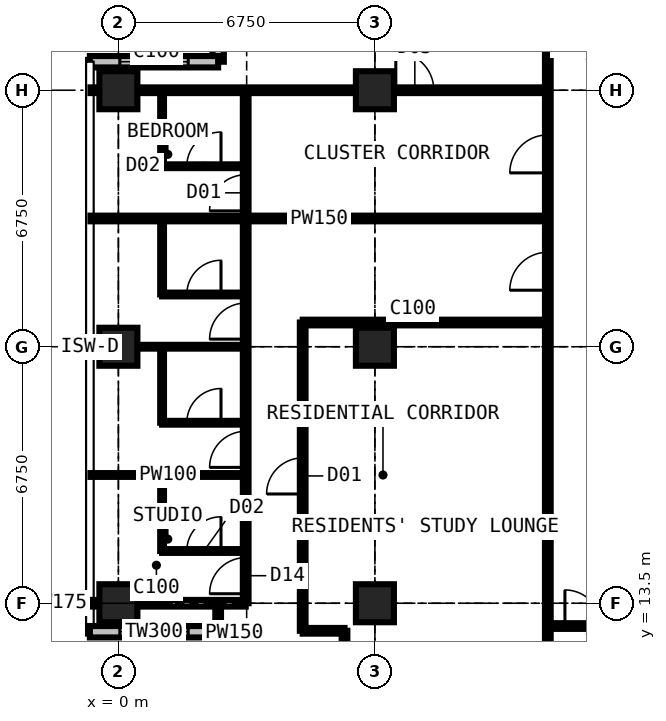
"""IFC4 building model, lengths in metres.
Left out: names, types, materials, properties, quantities, classifications, styles, units other than length and angle.
Written with IfcOpenShell. Run it as: python <this file> out.ifc"""

import sys

from ifc_helpers import new_model, si_unit, direction, frame, frame_2d, origin, origin_2d, place, context, subcontext, project, spatial, rectangle, extrude, element, fill, save


model = new_model("IFC4")
c1 = context("Model", 3, precision=1e-05, world=origin(), true_north=direction((0.0, 1.0)))
c2 = subcontext(c1, "Body", "Model", "MODEL_VIEW")
j1 = project(units=[si_unit("LENGTHUNIT", "METRE"), si_unit("PLANEANGLEUNIT", "RADIAN")], contexts=[c1])
p1 = place(None, origin())
s1 = spatial("IfcSite", under=j1, at=p1, CompositionType="ELEMENT")
p2 = place(p1, origin())
s2 = spatial("IfcBuilding", under=s1, at=p2, CompositionType="ELEMENT")
p3 = place(p2, frame((0.0, 0.0, 240.3)))
s3 = spatial("IfcBuildingStorey", under=s2, at=p3, CompositionType="ELEMENT", Elevation=240.3)
for number, where, z_axis, x_axis in (
    (1, (0.0, 13.5, 0.0), (0.0, 0.0, 1.0), (1.0, 0.0, 0.0)),
    (2, (0.0, 20.25, 0.0), (0.0, 0.0, 1.0), (1.0, 0.0, 0.0)),
    (3, (0.0, 27.0, 0.0), (0.0, 0.0, 1.0), (1.0, 0.0, 0.0)),
    (4, (6.75, 13.5, 0.0), (0.0, 0.0, 1.0), (1.0, 0.0, 0.0)),
    (5, (6.75, 20.25, 0.0), (0.0, 0.0, 1.0), (1.0, 0.0, 0.0)),
    (6, (6.75, 27.0, 0.0), (0.0, 0.0, 1.0), (1.0, 0.0, 0.0)),
):
    element("IfcColumn", number, at=place(p3, frame(where, z_axis=z_axis, x_axis=x_axis)), inside=s3, PredefinedType="COLUMN", context=c2, shape_type="SweptSolid", body=[
        extrude(rectangle(XDim=1.0, YDim=1.0, at=origin_2d()), origin(), (0.0, 0.0, 1.0), 3.6),
    ])
p4 = place(p3, frame((2.625, 31.125, 0.0), z_axis=(0.0, 0.0, 1.0), x_axis=(0.0, -1.0, 0.0)))
e7 = element("IfcWall", 7, at=p4, inside=s3, PredefinedType="SOLIDWALL", context=c2, shape_type="SweptSolid", body=[
    extrude(rectangle(XDim=3.375, YDim=0.3, at=frame_2d((1.688, 0.0))), origin(), (0.0, 0.0, 1.0), 3.375),
])
p5 = place(p4, frame((0.788, 0.0, 0.6)))
e8 = element("IfcOpeningElement", 8, at=p5, cuts=e7, PredefinedType="OPENING", context=c2, shape_type="SweptSolid", body=[
    extrude(rectangle(XDim=1.8, YDim=2.1, at=frame_2d((0.9, 1.05))), frame((0.0, 0.16, 0.0), z_axis=(0.0, -1.0, 0.0), x_axis=(1.0, 0.0, 0.0)), (0.0, 0.0, 1.0), 0.32),
])
p6 = place(p3, frame((2.625, 27.75, 0.0), z_axis=(0.0, 0.0, 1.0), x_axis=(-1.0, 0.0, 0.0)))
e9 = element("IfcWall", 9, at=p6, inside=s3, PredefinedType="SOLIDWALL", context=c2, shape_type="SweptSolid", body=[
    extrude(rectangle(XDim=3.375, YDim=0.3, at=frame_2d((1.688, 0.0))), origin(), (0.0, 0.0, 1.0), 3.375),
])
p7 = place(p6, frame((0.788, 0.0, 0.6)))
e10 = element("IfcOpeningElement", 10, at=p7, cuts=e9, PredefinedType="OPENING", context=c2, shape_type="SweptSolid", body=[
    extrude(rectangle(XDim=1.8, YDim=2.1, at=frame_2d((0.9, 1.05))), frame((0.0, 0.16, 0.0), z_axis=(0.0, -1.0, 0.0), x_axis=(1.0, 0.0, 0.0)), (0.0, 0.0, 1.0), 0.32),
])
p8 = place(p3, frame((-0.75, 12.75, 0.0), z_axis=(0.0, 0.0, 1.0), x_axis=(1.0, 0.0, 0.0)))
e11 = element("IfcWall", 11, at=p8, inside=s3, PredefinedType="SOLIDWALL", context=c2, shape_type="SweptSolid", body=[
    extrude(rectangle(XDim=3.375, YDim=0.3, at=frame_2d((1.688, 0.0))), origin(), (0.0, 0.0, 1.0), 3.375),
])
p9 = place(p8, frame((0.788, 0.0, 0.6)))
e12 = element("IfcOpeningElement", 12, at=p9, cuts=e11, PredefinedType="OPENING", context=c2, shape_type="SweptSolid", body=[
    extrude(rectangle(XDim=1.8, YDim=2.1, at=frame_2d((0.9, 1.05))), frame((0.0, 0.16, 0.0), z_axis=(0.0, -1.0, 0.0), x_axis=(1.0, 0.0, 0.0)), (0.0, 0.0, 1.0), 0.32),
])
p10 = place(p3, frame((2.625, 12.75, 0.0), z_axis=(0.0, 0.0, 1.0), x_axis=(0.0, -1.0, 0.0)))
e13 = element("IfcWall", 13, at=p10, inside=s3, PredefinedType="SOLIDWALL", context=c2, shape_type="SweptSolid", body=[
    extrude(rectangle(XDim=3.375, YDim=0.3, at=frame_2d((1.688, 0.0))), origin(), (0.0, 0.0, 1.0), 3.375),
])
p11 = place(p10, frame((0.788, 0.0, 0.6)))
e14 = element("IfcOpeningElement", 14, at=p11, cuts=e13, PredefinedType="OPENING", context=c2, shape_type="SweptSolid", body=[
    extrude(rectangle(XDim=1.8, YDim=2.1, at=frame_2d((0.9, 1.05))), frame((0.0, 0.16, 0.0), z_axis=(0.0, -1.0, 0.0), x_axis=(1.0, 0.0, 0.0)), (0.0, 0.0, 1.0), 0.32),
])
p12 = place(p3, frame((-0.734, 13.5, 0.0), z_axis=(0.0, 0.0, 1.0), x_axis=(1.0, 0.0, 0.0)))
e15 = element("IfcWall", 15, at=p12, inside=s3, PredefinedType="PARTITIONING", context=c2, shape_type="SweptSolid", body=[
    extrude(rectangle(XDim=4.084, YDim=0.175, at=frame_2d((2.042, 0.0))), origin(), (0.0, 0.0, 1.0), 2.877),
])
p13 = place(p3, frame((-0.734, 16.875, 0.0), z_axis=(0.0, 0.0, 1.0), x_axis=(1.0, 0.0, 0.0)))
e16 = element("IfcWall", 16, at=p13, inside=s3, PredefinedType="PARTITIONING", context=c2, shape_type="SweptSolid", body=[
    extrude(rectangle(XDim=4.084, YDim=0.1, at=frame_2d((2.042, 0.0))), origin(), (0.0, 0.0, 1.0), 3.375),
])
p14 = place(p3, frame((-0.734, 20.25, 0.0), z_axis=(0.0, 0.0, 1.0), x_axis=(1.0, 0.0, 0.0)))
e17 = element("IfcWall", 17, at=p14, inside=s3, PredefinedType="PARTITIONING", context=c2, shape_type="SweptSolid", body=[
    extrude(rectangle(XDim=4.084, YDim=0.1, at=frame_2d((2.042, 0.0))), origin(), (0.0, 0.0, 1.0), 2.877),
])
p15 = place(p3, frame((-0.734, 23.625, 0.0), z_axis=(0.0, 0.0, 1.0), x_axis=(1.0, 0.0, 0.0)))
e18 = element("IfcWall", 18, at=p15, inside=s3, PredefinedType="PARTITIONING", context=c2, shape_type="SweptSolid", body=[
    extrude(rectangle(XDim=12.034, YDim=0.15, at=frame_2d((6.017, 0.0))), origin(), (0.0, 0.0, 1.0), 3.375),
])
p16 = place(p3, frame((-0.734, 27.0, 0.0), z_axis=(0.0, 0.0, 1.0), x_axis=(1.0, 0.0, 0.0)))
e19 = element("IfcWall", 19, at=p16, inside=s3, PredefinedType="PARTITIONING", context=c2, shape_type="SweptSolid", body=[
    extrude(rectangle(XDim=12.034, YDim=0.15, at=frame_2d((6.017, 0.0))), origin(), (0.0, 0.0, 1.0), 2.877),
])
p17 = place(p16, frame((8.034, 0.0, 0.0)))
e20 = element("IfcOpeningElement", 20, at=p17, cuts=e19, PredefinedType="OPENING", context=c2, shape_type="SweptSolid", body=[
    extrude(rectangle(XDim=1.0, YDim=2.2, at=frame_2d((0.5, 1.1))), frame((0.0, 0.085, 0.0), z_axis=(0.0, -1.0, 0.0), x_axis=(1.0, 0.0, 0.0)), (0.0, 0.0, 1.0), 0.17),
])
p18 = place(p3, frame((1.15, 14.875, 0.0), z_axis=(0.0, 0.0, 1.0), x_axis=(0.0, 1.0, 0.0)))
e21 = element("IfcWall", 21, at=p18, inside=s3, PredefinedType="PARTITIONING", context=c2, shape_type="SweptSolid", body=[
    extrude(rectangle(XDim=2.0, YDim=0.1, at=frame_2d((1.0, 0.0))), origin(), (0.0, 0.0, 1.0), 3.375),
])
p19 = place(p3, frame((1.15, 14.875, 0.0), z_axis=(0.0, 0.0, 1.0), x_axis=(1.0, 0.0, 0.0)))
e22 = element("IfcWall", 22, at=p19, inside=s3, PredefinedType="PARTITIONING", context=c2, shape_type="SweptSolid", body=[
    extrude(rectangle(XDim=2.2, YDim=0.1, at=frame_2d((1.1, 0.0))), origin(), (0.0, 0.0, 1.0), 3.375),
])
p20 = place(p19, frame((0.65, 0.0, 0.0)))
e23 = element("IfcOpeningElement", 23, at=p20, cuts=e22, PredefinedType="OPENING", context=c2, shape_type="SweptSolid", body=[
    extrude(rectangle(XDim=0.9, YDim=2.2, at=frame_2d((0.45, 1.1))), frame((0.0, 0.06, 0.0), z_axis=(0.0, -1.0, 0.0), x_axis=(1.0, 0.0, 0.0)), (0.0, 0.0, 1.0), 0.12),
])
p21 = place(p3, frame((1.15, 18.25, 0.0), z_axis=(0.0, 0.0, 1.0), x_axis=(0.0, 1.0, 0.0)))
e24 = element("IfcWall", 24, at=p21, inside=s3, PredefinedType="PARTITIONING", context=c2, shape_type="SweptSolid", body=[
    extrude(rectangle(XDim=2.0, YDim=0.1, at=frame_2d((1.0, 0.0))), origin(), (0.0, 0.0, 1.0), 3.375),
])
p22 = place(p3, frame((1.15, 18.25, 0.0), z_axis=(0.0, 0.0, 1.0), x_axis=(1.0, 0.0, 0.0)))
e25 = element("IfcWall", 25, at=p22, inside=s3, PredefinedType="PARTITIONING", context=c2, shape_type="SweptSolid", body=[
    extrude(rectangle(XDim=2.2, YDim=0.1, at=frame_2d((1.1, 0.0))), origin(), (0.0, 0.0, 1.0), 3.375),
])
p23 = place(p22, frame((0.65, 0.0, 0.0)))
e26 = element("IfcOpeningElement", 26, at=p23, cuts=e25, PredefinedType="OPENING", context=c2, shape_type="SweptSolid", body=[
    extrude(rectangle(XDim=0.9, YDim=2.2, at=frame_2d((0.45, 1.1))), frame((0.0, 0.06, 0.0), z_axis=(0.0, -1.0, 0.0), x_axis=(1.0, 0.0, 0.0)), (0.0, 0.0, 1.0), 0.12),
])
p24 = place(p3, frame((1.15, 21.625, 0.0), z_axis=(0.0, 0.0, 1.0), x_axis=(0.0, 1.0, 0.0)))
e27 = element("IfcWall", 27, at=p24, inside=s3, PredefinedType="PARTITIONING", context=c2, shape_type="SweptSolid", body=[
    extrude(rectangle(XDim=2.0, YDim=0.1, at=frame_2d((1.0, 0.0))), origin(), (0.0, 0.0, 1.0), 3.375),
])
p25 = place(p3, frame((1.15, 21.625, 0.0), z_axis=(0.0, 0.0, 1.0), x_axis=(1.0, 0.0, 0.0)))
e28 = element("IfcWall", 28, at=p25, inside=s3, PredefinedType="PARTITIONING", context=c2, shape_type="SweptSolid", body=[
    extrude(rectangle(XDim=2.2, YDim=0.1, at=frame_2d((1.1, 0.0))), origin(), (0.0, 0.0, 1.0), 3.375),
])
p26 = place(p25, frame((0.65, 0.0, 0.0)))
e29 = element("IfcOpeningElement", 29, at=p26, cuts=e28, PredefinedType="OPENING", context=c2, shape_type="SweptSolid", body=[
    extrude(rectangle(XDim=0.9, YDim=2.2, at=frame_2d((0.45, 1.1))), frame((0.0, 0.06, 0.0), z_axis=(0.0, -1.0, 0.0), x_axis=(1.0, 0.0, 0.0)), (0.0, 0.0, 1.0), 0.12),
])
p27 = place(p3, frame((1.15, 25.0, 0.0), z_axis=(0.0, 0.0, 1.0), x_axis=(0.0, 1.0, 0.0)))
e30 = element("IfcWall", 30, at=p27, inside=s3, PredefinedType="PARTITIONING", context=c2, shape_type="SweptSolid", body=[
    extrude(rectangle(XDim=2.0, YDim=0.1, at=frame_2d((1.0, 0.0))), origin(), (0.0, 0.0, 1.0), 3.375),
])
p28 = place(p3, frame((1.15, 25.0, 0.0), z_axis=(0.0, 0.0, 1.0), x_axis=(1.0, 0.0, 0.0)))
e31 = element("IfcWall", 31, at=p28, inside=s3, PredefinedType="PARTITIONING", context=c2, shape_type="SweptSolid", body=[
    extrude(rectangle(XDim=2.2, YDim=0.1, at=frame_2d((1.1, 0.0))), origin(), (0.0, 0.0, 1.0), 3.375),
])
p29 = place(p28, frame((0.65, 0.0, 0.0)))
e32 = element("IfcOpeningElement", 32, at=p29, cuts=e31, PredefinedType="OPENING", context=c2, shape_type="SweptSolid", body=[
    extrude(rectangle(XDim=0.9, YDim=2.2, at=frame_2d((0.45, 1.1))), frame((0.0, 0.06, 0.0), z_axis=(0.0, -1.0, 0.0), x_axis=(1.0, 0.0, 0.0)), (0.0, 0.0, 1.0), 0.12),
])
p30 = place(p3, frame((2.625, 12.766, 0.0), z_axis=(0.0, 0.0, 1.0), x_axis=(0.0, 1.0, 0.0)))
e33 = element("IfcWall", 33, at=p30, inside=s3, PredefinedType="PARTITIONING", context=c2, shape_type="SweptSolid", body=[
    extrude(rectangle(XDim=0.734, YDim=0.15, at=frame_2d((0.367, 0.0))), origin(), (0.0, 0.0, 1.0), 3.375),
])
p31 = place(p3, frame((3.35, 13.5, 0.0), z_axis=(0.0, 0.0, 1.0), x_axis=(0.0, 1.0, 0.0)))
e34 = element("IfcWall", 34, at=p31, inside=s3, PredefinedType="PARTITIONING", context=c2, shape_type="SweptSolid", body=[
    extrude(rectangle(XDim=13.5, YDim=0.15, at=frame_2d((6.75, 0.0))), origin(), (0.0, 0.0, 1.0), 3.375),
])
p32 = place(p31, frame((10.325, 0.0, 0.0)))
e35 = element("IfcOpeningElement", 35, at=p32, cuts=e34, PredefinedType="OPENING", context=c2, shape_type="SweptSolid", body=[
    extrude(rectangle(XDim=0.95, YDim=2.2, at=frame_2d((0.475, 1.1))), frame((0.0, 0.085, 0.0), z_axis=(0.0, -1.0, 0.0), x_axis=(1.0, 0.0, 0.0)), (0.0, 0.0, 1.0), 0.17),
])
p33 = place(p31, frame((0.25, 0.0, 0.0)))
e36 = element("IfcOpeningElement", 36, at=p33, cuts=e34, PredefinedType="OPENING", context=c2, shape_type="SweptSolid", body=[
    extrude(rectangle(XDim=0.95, YDim=2.2, at=frame_2d((0.475, 1.1))), frame((0.0, 0.085, 0.0), z_axis=(0.0, -1.0, 0.0), x_axis=(1.0, 0.0, 0.0)), (0.0, 0.0, 1.0), 0.17),
])
p34 = place(p31, frame((3.575, 0.0, 0.0)))
e37 = element("IfcOpeningElement", 37, at=p34, cuts=e34, PredefinedType="OPENING", context=c2, shape_type="SweptSolid", body=[
    extrude(rectangle(XDim=0.95, YDim=2.2, at=frame_2d((0.475, 1.1))), frame((0.0, 0.085, 0.0), z_axis=(0.0, -1.0, 0.0), x_axis=(1.0, 0.0, 0.0)), (0.0, 0.0, 1.0), 0.17),
])
p35 = place(p31, frame((6.95, 0.0, 0.0)))
e38 = element("IfcOpeningElement", 38, at=p35, cuts=e34, PredefinedType="OPENING", context=c2, shape_type="SweptSolid", body=[
    extrude(rectangle(XDim=0.95, YDim=2.2, at=frame_2d((0.475, 1.1))), frame((0.0, 0.085, 0.0), z_axis=(0.0, -1.0, 0.0), x_axis=(1.0, 0.0, 0.0)), (0.0, 0.0, 1.0), 0.17),
])
p36 = place(p3, frame((4.85, 12.775, 0.0), z_axis=(0.0, 0.0, 1.0), x_axis=(0.0, 1.0, 0.0)))
e39 = element("IfcWall", 39, at=p36, inside=s3, PredefinedType="PARTITIONING", context=c2, shape_type="SweptSolid", body=[
    extrude(rectangle(XDim=8.113, YDim=0.15, at=frame_2d((4.056, 0.0))), origin(), (0.0, 0.0, 1.0), 3.375),
])
p37 = place(p36, frame((3.6, 0.0, 0.0)))
e40 = element("IfcOpeningElement", 40, at=p37, cuts=e39, PredefinedType="OPENING", context=c2, shape_type="SweptSolid", body=[
    extrude(rectangle(XDim=0.95, YDim=2.2, at=frame_2d((0.475, 1.1))), frame((0.0, 0.085, 0.0), z_axis=(0.0, -1.0, 0.0), x_axis=(1.0, 0.0, 0.0)), (0.0, 0.0, 1.0), 0.17),
])
p38 = place(p3, frame((4.85, 12.775, 0.0), z_axis=(0.0, 0.0, 1.0), x_axis=(1.0, 0.0, 0.0)))
e41 = element("IfcWall", 41, at=p38, inside=s3, PredefinedType="PARTITIONING", context=c2, shape_type="SweptSolid", body=[
    extrude(rectangle(XDim=1.1, YDim=0.15, at=frame_2d((0.55, 0.0))), origin(), (0.0, 0.0, 1.0), 3.375),
])
p39 = place(p3, frame((4.85, 20.887, 0.0), z_axis=(0.0, 0.0, 1.0), x_axis=(1.0, 0.0, 0.0)))
e42 = element("IfcWall", 42, at=p39, inside=s3, PredefinedType="PARTITIONING", context=c2, shape_type="SweptSolid", body=[
    extrude(rectangle(XDim=6.45, YDim=0.15, at=frame_2d((3.225, 0.0))), origin(), (0.0, 0.0, 1.0), 3.375),
])
p40 = place(p3, frame((5.95, 10.125, 0.0), z_axis=(0.0, 0.0, 1.0), x_axis=(0.0, 1.0, 0.0)))
e43 = element("IfcWall", 43, at=p40, inside=s3, PredefinedType="PARTITIONING", context=c2, shape_type="SweptSolid", body=[
    extrude(rectangle(XDim=2.65, YDim=0.15, at=frame_2d((1.325, 0.0))), origin(), (0.0, 0.0, 1.0), 3.375),
])
p41 = place(p3, frame((11.3, 11.3, 0.0), z_axis=(0.0, 0.0, 1.0), x_axis=(0.0, 1.0, 0.0)))
e44 = element("IfcWall", 44, at=p41, inside=s3, PredefinedType="PARTITIONING", context=c2, shape_type="SweptSolid", body=[
    extrude(rectangle(XDim=19.3, YDim=0.15, at=frame_2d((9.65, 0.0))), origin(), (0.0, 0.0, 1.0), 3.375),
])
p42 = place(p41, frame((13.525, 0.0, 0.0)))
e45 = element("IfcOpeningElement", 45, at=p42, cuts=e44, PredefinedType="OPENING", context=c2, shape_type="SweptSolid", body=[
    extrude(rectangle(XDim=1.0, YDim=2.2, at=frame_2d((0.5, 1.1))), frame((0.0, 0.085, 0.0), z_axis=(0.0, -1.0, 0.0), x_axis=(1.0, 0.0, 0.0)), (0.0, 0.0, 1.0), 0.17),
])
p43 = place(p41, frame((10.438, 0.0, 0.0)))
e46 = element("IfcOpeningElement", 46, at=p43, cuts=e44, PredefinedType="OPENING", context=c2, shape_type="SweptSolid", body=[
    extrude(rectangle(XDim=1.0, YDim=2.2, at=frame_2d((0.5, 1.1))), frame((0.0, 0.085, 0.0), z_axis=(0.0, -1.0, 0.0), x_axis=(1.0, 0.0, 0.0)), (0.0, 0.0, 1.0), 0.17),
])
p44 = place(p3, frame((11.3, 12.9, 0.0), z_axis=(0.0, 0.0, 1.0), x_axis=(1.0, 0.0, 0.0)))
e47 = element("IfcWall", 47, at=p44, inside=s3, PredefinedType="PARTITIONING", context=c2, shape_type="SweptSolid", body=[
    extrude(rectangle(XDim=1.9, YDim=0.15, at=frame_2d((0.95, 0.0))), origin(), (0.0, 0.0, 1.0), 2.877),
])
p45 = place(p44, frame((0.45, 0.0, 0.0)))
e48 = element("IfcOpeningElement", 48, at=p45, cuts=e47, PredefinedType="OPENING", context=c2, shape_type="SweptSolid", body=[
    extrude(rectangle(XDim=0.95, YDim=2.2, at=frame_2d((0.475, 1.1))), frame((0.0, 0.085, 0.0), z_axis=(0.0, -1.0, 0.0), x_axis=(1.0, 0.0, 0.0)), (0.0, 0.0, 1.0), 0.17),
])
p46 = place(p7, origin())
e49 = element("IfcWindow", 49, at=p46, inside=s3, PartitioningType="SINGLE_PANEL", PredefinedType="WINDOW", context=c2, shape_type="SweptSolid", body=[
    extrude(rectangle(XDim=1.8, YDim=2.1, at=frame_2d((0.9, 1.05))), frame((0.0, 0.03, 0.0), z_axis=(0.0, -1.0, 0.0), x_axis=(1.0, 0.0, 0.0)), (0.0, 0.0, 1.0), 0.06),
])
fill(e10, e49)
p47 = place(p9, origin())
e50 = element("IfcWindow", 50, at=p47, inside=s3, PartitioningType="SINGLE_PANEL", PredefinedType="WINDOW", context=c2, shape_type="SweptSolid", body=[
    extrude(rectangle(XDim=1.8, YDim=2.1, at=frame_2d((0.9, 1.05))), frame((0.0, 0.03, 0.0), z_axis=(0.0, -1.0, 0.0), x_axis=(1.0, 0.0, 0.0)), (0.0, 0.0, 1.0), 0.06),
])
fill(e12, e50)
p48 = place(p45, origin())
e51 = element("IfcDoor", 51, at=p48, inside=s3, OperationType="SINGLE_SWING_LEFT", PredefinedType="DOOR", context=c2, shape_type="SweptSolid", body=[
    extrude(rectangle(XDim=0.95, YDim=2.2, at=frame_2d((0.475, 1.1))), frame((0.0, 0.025, 0.0), z_axis=(0.0, -1.0, 0.0), x_axis=(1.0, 0.0, 0.0)), (0.0, 0.0, 1.0), 0.05),
])
fill(e48, e51)
p49 = place(p17, origin())
e52 = element("IfcDoor", 52, at=p49, inside=s3, OperationType="SINGLE_SWING_LEFT", PredefinedType="DOOR", context=c2, shape_type="SweptSolid", body=[
    extrude(rectangle(XDim=1.0, YDim=2.2, at=frame_2d((0.5, 1.1))), frame((0.0, 0.025, 0.0), z_axis=(0.0, -1.0, 0.0), x_axis=(1.0, 0.0, 0.0)), (0.0, 0.0, 1.0), 0.05),
])
fill(e20, e52)
p50 = place(p32, origin())
e53 = element("IfcDoor", 53, at=p50, inside=s3, OperationType="SINGLE_SWING_LEFT", PredefinedType="DOOR", context=c2, shape_type="SweptSolid", body=[
    extrude(rectangle(XDim=0.95, YDim=2.2, at=frame_2d((0.475, 1.1))), frame((0.0, 0.025, 0.0), z_axis=(0.0, -1.0, 0.0), x_axis=(1.0, 0.0, 0.0)), (0.0, 0.0, 1.0), 0.05),
])
fill(e35, e53)
p51 = place(p29, origin())
e54 = element("IfcDoor", 54, at=p51, inside=s3, OperationType="SINGLE_SWING_RIGHT", PredefinedType="DOOR", context=c2, shape_type="SweptSolid", body=[
    extrude(rectangle(XDim=0.9, YDim=2.2, at=frame_2d((0.45, 1.1))), frame((0.0, 0.025, 0.0), z_axis=(0.0, -1.0, 0.0), x_axis=(1.0, 0.0, 0.0)), (0.0, 0.0, 1.0), 0.05),
])
fill(e32, e54)
p52 = place(p42, origin())
e55 = element("IfcDoor", 55, at=p52, inside=s3, OperationType="SINGLE_SWING_LEFT", PredefinedType="DOOR", context=c2, shape_type="SweptSolid", body=[
    extrude(rectangle(XDim=1.0, YDim=2.2, at=frame_2d((0.5, 1.1))), frame((0.0, 0.025, 0.0), z_axis=(0.0, -1.0, 0.0), x_axis=(1.0, 0.0, 0.0)), (0.0, 0.0, 1.0), 0.05),
])
fill(e45, e55)
p53 = place(p33, origin())
e56 = element("IfcDoor", 56, at=p53, inside=s3, OperationType="SINGLE_SWING_LEFT", PredefinedType="DOOR", context=c2, shape_type="SweptSolid", body=[
    extrude(rectangle(XDim=0.95, YDim=2.2, at=frame_2d((0.475, 1.1))), frame((0.0, 0.025, 0.0), z_axis=(0.0, -1.0, 0.0), x_axis=(1.0, 0.0, 0.0)), (0.0, 0.0, 1.0), 0.05),
])
fill(e36, e56)
p54 = place(p20, origin())
e57 = element("IfcDoor", 57, at=p54, inside=s3, OperationType="SINGLE_SWING_RIGHT", PredefinedType="DOOR", context=c2, shape_type="SweptSolid", body=[
    extrude(rectangle(XDim=0.9, YDim=2.2, at=frame_2d((0.45, 1.1))), frame((0.0, 0.025, 0.0), z_axis=(0.0, -1.0, 0.0), x_axis=(1.0, 0.0, 0.0)), (0.0, 0.0, 1.0), 0.05),
])
fill(e23, e57)
p55 = place(p34, origin())
e58 = element("IfcDoor", 58, at=p55, inside=s3, OperationType="SINGLE_SWING_LEFT", PredefinedType="DOOR", context=c2, shape_type="SweptSolid", body=[
    extrude(rectangle(XDim=0.95, YDim=2.2, at=frame_2d((0.475, 1.1))), frame((0.0, 0.025, 0.0), z_axis=(0.0, -1.0, 0.0), x_axis=(1.0, 0.0, 0.0)), (0.0, 0.0, 1.0), 0.05),
])
fill(e37, e58)
p56 = place(p23, origin())
e59 = element("IfcDoor", 59, at=p56, inside=s3, OperationType="SINGLE_SWING_RIGHT", PredefinedType="DOOR", context=c2, shape_type="SweptSolid", body=[
    extrude(rectangle(XDim=0.9, YDim=2.2, at=frame_2d((0.45, 1.1))), frame((0.0, 0.025, 0.0), z_axis=(0.0, -1.0, 0.0), x_axis=(1.0, 0.0, 0.0)), (0.0, 0.0, 1.0), 0.05),
])
fill(e26, e59)
p57 = place(p35, origin())
e60 = element("IfcDoor", 60, at=p57, inside=s3, OperationType="SINGLE_SWING_LEFT", PredefinedType="DOOR", context=c2, shape_type="SweptSolid", body=[
    extrude(rectangle(XDim=0.95, YDim=2.2, at=frame_2d((0.475, 1.1))), frame((0.0, 0.025, 0.0), z_axis=(0.0, -1.0, 0.0), x_axis=(1.0, 0.0, 0.0)), (0.0, 0.0, 1.0), 0.05),
])
fill(e38, e60)
p58 = place(p26, origin())
e61 = element("IfcDoor", 61, at=p58, inside=s3, OperationType="SINGLE_SWING_RIGHT", PredefinedType="DOOR", context=c2, shape_type="SweptSolid", body=[
    extrude(rectangle(XDim=0.9, YDim=2.2, at=frame_2d((0.45, 1.1))), frame((0.0, 0.025, 0.0), z_axis=(0.0, -1.0, 0.0), x_axis=(1.0, 0.0, 0.0)), (0.0, 0.0, 1.0), 0.05),
])
fill(e29, e61)
p59 = place(p43, origin())
e62 = element("IfcDoor", 62, at=p59, inside=s3, OperationType="SINGLE_SWING_LEFT", PredefinedType="DOOR", context=c2, shape_type="SweptSolid", body=[
    extrude(rectangle(XDim=1.0, YDim=2.2, at=frame_2d((0.5, 1.1))), frame((0.0, 0.025, 0.0), z_axis=(0.0, -1.0, 0.0), x_axis=(1.0, 0.0, 0.0)), (0.0, 0.0, 1.0), 0.05),
])
fill(e46, e62)
p60 = place(p37, origin())
e63 = element("IfcDoor", 63, at=p60, inside=s3, OperationType="SINGLE_SWING_LEFT", PredefinedType="DOOR", context=c2, shape_type="SweptSolid", body=[
    extrude(rectangle(XDim=0.95, YDim=2.2, at=frame_2d((0.475, 1.1))), frame((0.0, 0.025, 0.0), z_axis=(0.0, -1.0, 0.0), x_axis=(1.0, 0.0, 0.0)), (0.0, 0.0, 1.0), 0.05),
])
fill(e40, e63)
save(model, sys.argv[1])
